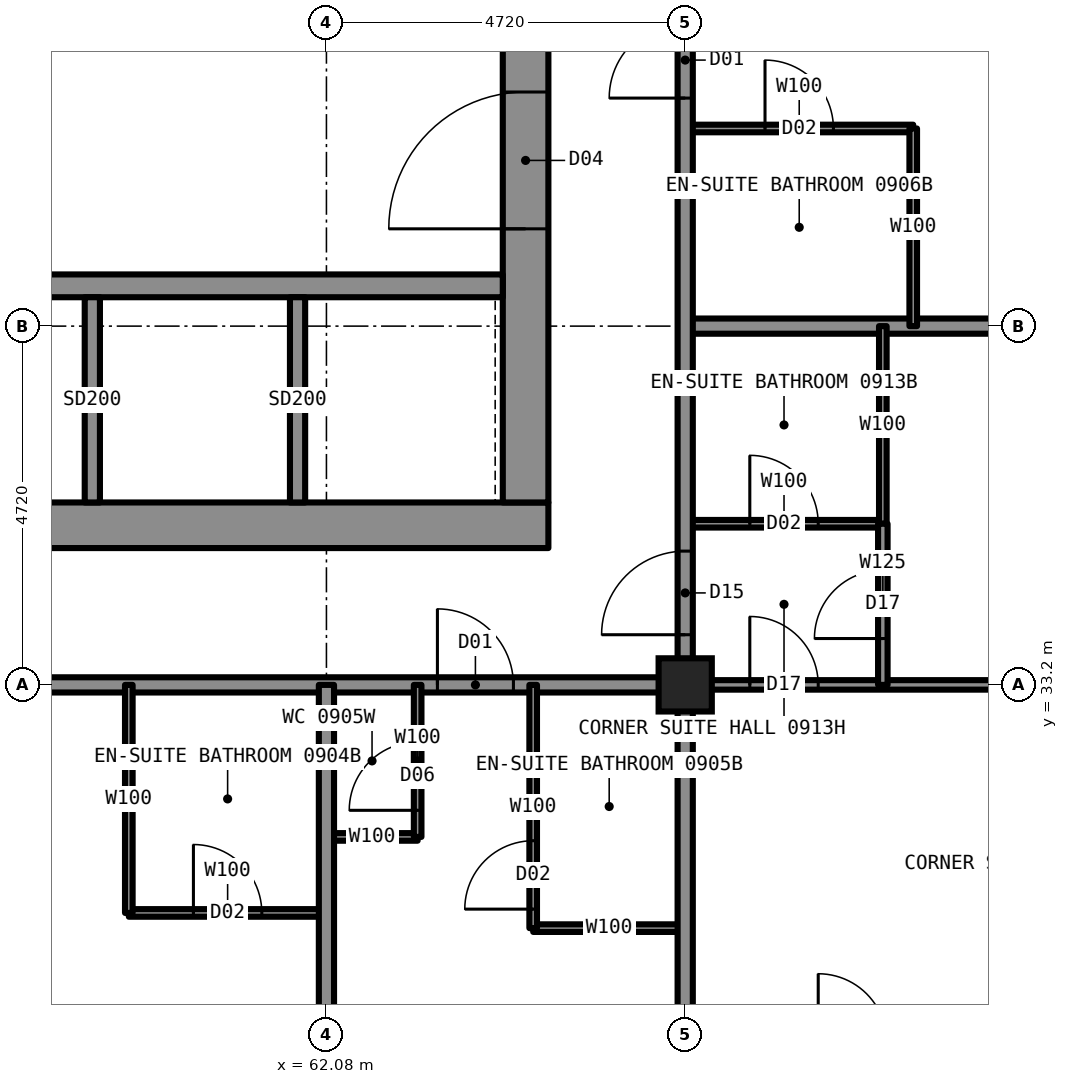
"""IFC4 building model, lengths in metres.
Left out: names, types, materials, properties, quantities, classifications, styles, units other than length and angle.
Written with IfcOpenShell. Run it as: python <this file> out.ifc"""

import sys

from ifc_helpers import new_model, si_unit, direction, frame, frame_2d, origin, origin_2d, place, context, subcontext, project, spatial, rectangle, hollow_rectangle, extrude, element, fill, save


model = new_model("IFC4")
c1 = context("Model", 3, precision=1e-05, world=origin(), true_north=direction((0.0, 1.0)))
c2 = subcontext(c1, "Body", "Model", "MODEL_VIEW")
j1 = project(units=[si_unit("LENGTHUNIT", "METRE"), si_unit("PLANEANGLEUNIT", "RADIAN")], contexts=[c1])
p1 = place(None, origin())
s1 = spatial("IfcSite", under=j1, at=p1, CompositionType="ELEMENT")
p2 = place(p1, origin())
s2 = spatial("IfcBuilding", under=s1, at=p2, CompositionType="ELEMENT")
p3 = place(p2, frame((0.0, 0.0, 39.0)))
s3 = spatial("IfcBuildingStorey", under=s2, at=p3, CompositionType="ELEMENT", Elevation=39.0)
p4 = place(p3, frame((66.8, 33.2, 0.0), z_axis=(0.0, 0.0, 1.0), x_axis=(1.0, 0.0, 0.0)))
e1 = element("IfcColumn", 1, at=p4, inside=s3, PredefinedType="COLUMN", context=c2, shape_type="SweptSolid", body=[
    extrude(hollow_rectangle(XDim=0.7, YDim=0.7, WallThickness=0.06, at=origin_2d()), origin(), (0.0, 0.0, 1.0), 3.5),
])
p5 = place(p3, frame((45.0, 35.3, 0.0), z_axis=(0.0, 0.0, 1.0), x_axis=(1.0, 0.0, 0.0)))
e2 = element("IfcWall", 2, at=p5, inside=s3, PredefinedType="SHEAR", context=c2, shape_type="SweptSolid", body=[
    extrude(rectangle(XDim=20.0, YDim=0.6, at=frame_2d((10.0, 0.0))), origin(), (0.0, 0.0, 1.0), 3.5),
])
p6 = place(p3, frame((64.7, 35.6, 0.0), z_axis=(0.0, 0.0, 1.0), x_axis=(0.0, 1.0, 0.0)))
e3 = element("IfcWall", 3, at=p6, inside=s3, PredefinedType="SHEAR", context=c2, shape_type="SweptSolid", body=[
    extrude(rectangle(XDim=18.8, YDim=0.6, at=frame_2d((9.4, 0.0))), origin(), (0.0, 0.0, 1.0), 3.5),
])
p7 = place(p6, frame((13.4, 0.0, 0.0)))
e4 = element("IfcOpeningElement", 4, at=p7, cuts=e3, PredefinedType="OPENING", context=c2, shape_type="SweptSolid", body=[
    extrude(rectangle(XDim=1.8, YDim=2.2, at=frame_2d((0.9, 1.1))), frame((0.0, 0.31, 0.0), z_axis=(0.0, -1.0, 0.0), x_axis=(1.0, 0.0, 0.0)), (0.0, 0.0, 1.0), 0.62),
])
p8 = place(p6, frame((3.6, 0.0, 0.0)))
e5 = element("IfcOpeningElement", 5, at=p8, cuts=e3, PredefinedType="OPENING", context=c2, shape_type="SweptSolid", body=[
    extrude(rectangle(XDim=1.8, YDim=2.2, at=frame_2d((0.9, 1.1))), frame((0.0, 0.31, 0.0), z_axis=(0.0, -1.0, 0.0), x_axis=(1.0, 0.0, 0.0)), (0.0, 0.0, 1.0), 0.62),
])
p9 = place(p3, frame((45.6, 38.45, 0.0), z_axis=(0.0, 0.0, 1.0), x_axis=(1.0, 0.0, 0.0)))
e6 = element("IfcWall", 6, at=p9, inside=s3, PredefinedType="SHEAR", context=c2, shape_type="SweptSolid", body=[
    extrude(rectangle(XDim=18.8, YDim=0.3, at=frame_2d((9.4, 0.0))), origin(), (0.0, 0.0, 1.0), 3.5),
])
p10 = place(p3, frame((43.2, 33.2, 0.0), z_axis=(0.0, 0.0, 1.0), x_axis=(1.0, 0.0, 0.0)))
e7 = element("IfcWall", 7, at=p10, inside=s3, PredefinedType="PARTITIONING", context=c2, shape_type="SweptSolid", body=[
    extrude(rectangle(XDim=23.6, YDim=0.2, at=frame_2d((11.8, 0.0))), origin(), (0.0, 0.0, 1.0), 3.33),
])
p11 = place(p10, frame((2.55, 0.0, 0.0)))
e8 = element("IfcOpeningElement", 8, at=p11, cuts=e7, PredefinedType="OPENING", context=c2, shape_type="SweptSolid", body=[
    extrude(rectangle(XDim=1.0, YDim=2.2, at=frame_2d((0.5, 1.1))), frame((0.0, 0.11, 0.0), z_axis=(0.0, -1.0, 0.0), x_axis=(1.0, 0.0, 0.0)), (0.0, 0.0, 1.0), 0.22),
])
p12 = place(p10, frame((6.57, 0.0, 0.0)))
e9 = element("IfcOpeningElement", 9, at=p12, cuts=e7, PredefinedType="OPENING", context=c2, shape_type="SweptSolid", body=[
    extrude(rectangle(XDim=1.1, YDim=2.2, at=frame_2d((0.55, 1.1))), frame((0.0, 0.11, 0.0), z_axis=(0.0, -1.0, 0.0), x_axis=(1.0, 0.0, 0.0)), (0.0, 0.0, 1.0), 0.22),
])
p13 = place(p10, frame((20.34, 0.0, 0.0)))
e10 = element("IfcOpeningElement", 10, at=p13, cuts=e7, PredefinedType="OPENING", context=c2, shape_type="SweptSolid", body=[
    extrude(rectangle(XDim=1.0, YDim=2.2, at=frame_2d((0.5, 1.1))), frame((0.0, 0.11, 0.0), z_axis=(0.0, -1.0, 0.0), x_axis=(1.0, 0.0, 0.0)), (0.0, 0.0, 1.0), 0.22),
])
p14 = place(p3, frame((66.8, 33.2, 0.0), z_axis=(0.0, 0.0, 1.0), x_axis=(1.0, 0.0, 0.0)))
e11 = element("IfcWall", 11, at=p14, inside=s3, PredefinedType="PARTITIONING", context=c2, shape_type="SweptSolid", body=[
    extrude(rectangle(XDim=9.9, YDim=0.125, at=frame_2d((4.95, 0.0))), origin(), (0.0, 0.0, 1.0), 2.573),
])
p15 = place(p14, frame((0.85, 0.0, 0.0)))
e12 = element("IfcOpeningElement", 12, at=p15, cuts=e11, PredefinedType="OPENING", context=c2, shape_type="SweptSolid", body=[
    extrude(rectangle(XDim=0.9, YDim=2.2, at=frame_2d((0.45, 1.1))), frame((0.0, 0.073, 0.0), z_axis=(0.0, -1.0, 0.0), x_axis=(1.0, 0.0, 0.0)), (0.0, 0.0, 1.0), 0.145),
])
p16 = place(p3, frame((62.08, 31.2, 0.0), z_axis=(0.0, 0.0, 1.0), x_axis=(1.0, 0.0, 0.0)))
e13 = element("IfcWall", 13, at=p16, inside=s3, PredefinedType="PARTITIONING", context=c2, shape_type="SweptSolid", body=[
    extrude(rectangle(XDim=1.2, YDim=0.1, at=frame_2d((0.6, 0.0))), origin(), (0.0, 0.0, 1.0), 3.33),
])
p17 = place(p3, frame((59.48, 30.2, 0.0), z_axis=(0.0, 0.0, 1.0), x_axis=(1.0, 0.0, 0.0)))
e14 = element("IfcWall", 14, at=p17, inside=s3, PredefinedType="PARTITIONING", context=c2, shape_type="SweptSolid", body=[
    extrude(rectangle(XDim=2.6, YDim=0.1, at=frame_2d((1.3, 0.0))), origin(), (0.0, 0.0, 1.0), 3.33),
])
p18 = place(p17, frame((0.85, 0.0, 0.0)))
e15 = element("IfcOpeningElement", 15, at=p18, cuts=e14, PredefinedType="OPENING", context=c2, shape_type="SweptSolid", body=[
    extrude(rectangle(XDim=0.9, YDim=2.1, at=frame_2d((0.45, 1.05))), frame((0.0, 0.06, 0.0), z_axis=(0.0, -1.0, 0.0), x_axis=(1.0, 0.0, 0.0)), (0.0, 0.0, 1.0), 0.12),
])
p19 = place(p3, frame((64.8, 30.0, 0.0), z_axis=(0.0, 0.0, 1.0), x_axis=(1.0, 0.0, 0.0)))
e16 = element("IfcWall", 16, at=p19, inside=s3, PredefinedType="PARTITIONING", context=c2, shape_type="SweptSolid", body=[
    extrude(rectangle(XDim=2.0, YDim=0.1, at=frame_2d((1.0, 0.0))), origin(), (0.0, 0.0, 1.0), 3.33),
])
p20 = place(p3, frame((66.8, 40.52, 0.0), z_axis=(0.0, 0.0, 1.0), x_axis=(1.0, 0.0, 0.0)))
e17 = element("IfcWall", 17, at=p20, inside=s3, PredefinedType="PARTITIONING", context=c2, shape_type="SweptSolid", body=[
    extrude(rectangle(XDim=3.0, YDim=0.1, at=frame_2d((1.5, 0.0))), origin(), (0.0, 0.0, 1.0), 3.33),
])
p21 = place(p20, frame((1.05, 0.0, 0.0)))
e18 = element("IfcOpeningElement", 18, at=p21, cuts=e17, PredefinedType="OPENING", context=c2, shape_type="SweptSolid", body=[
    extrude(rectangle(XDim=0.9, YDim=2.1, at=frame_2d((0.45, 1.05))), frame((0.0, 0.06, 0.0), z_axis=(0.0, -1.0, 0.0), x_axis=(1.0, 0.0, 0.0)), (0.0, 0.0, 1.0), 0.12),
])
p22 = place(p3, frame((66.8, 37.92, 0.0), z_axis=(0.0, 0.0, 1.0), x_axis=(1.0, 0.0, 0.0)))
e19 = element("IfcWall", 19, at=p22, inside=s3, PredefinedType="PARTITIONING", context=c2, shape_type="SweptSolid", body=[
    extrude(rectangle(XDim=9.9, YDim=0.2, at=frame_2d((4.95, 0.0))), origin(), (0.0, 0.0, 1.0), 2.573),
])
p23 = place(p3, frame((66.8, 35.32, 0.0), z_axis=(0.0, 0.0, 1.0), x_axis=(1.0, 0.0, 0.0)))
e20 = element("IfcWall", 20, at=p23, inside=s3, PredefinedType="PARTITIONING", context=c2, shape_type="SweptSolid", body=[
    extrude(rectangle(XDim=2.6, YDim=0.1, at=frame_2d((1.3, 0.0))), origin(), (0.0, 0.0, 1.0), 3.33),
])
p24 = place(p23, frame((0.85, 0.0, 0.0)))
e21 = element("IfcOpeningElement", 21, at=p24, cuts=e20, PredefinedType="OPENING", context=c2, shape_type="SweptSolid", body=[
    extrude(rectangle(XDim=0.9, YDim=2.1, at=frame_2d((0.45, 1.05))), frame((0.0, 0.06, 0.0), z_axis=(0.0, -1.0, 0.0), x_axis=(1.0, 0.0, 0.0)), (0.0, 0.0, 1.0), 0.12),
])
p25 = place(p3, frame((66.8, 33.2, 0.0), z_axis=(0.0, 0.0, 1.0), x_axis=(0.0, 1.0, 0.0)))
e22 = element("IfcWall", 22, at=p25, inside=s3, PredefinedType="PARTITIONING", context=c2, shape_type="SweptSolid", body=[
    extrude(rectangle(XDim=23.58, YDim=0.2, at=frame_2d((11.79, 0.0))), origin(), (0.0, 0.0, 1.0), 3.33),
])
p26 = place(p25, frame((7.72, 0.0, 0.0)))
e23 = element("IfcOpeningElement", 23, at=p26, cuts=e22, PredefinedType="OPENING", context=c2, shape_type="SweptSolid", body=[
    extrude(rectangle(XDim=1.0, YDim=2.2, at=frame_2d((0.5, 1.1))), frame((0.0, 0.11, 0.0), z_axis=(0.0, -1.0, 0.0), x_axis=(1.0, 0.0, 0.0)), (0.0, 0.0, 1.0), 0.22),
])
p27 = place(p25, frame((17.31, 0.0, 0.0)))
e24 = element("IfcOpeningElement", 24, at=p27, cuts=e22, PredefinedType="OPENING", context=c2, shape_type="SweptSolid", body=[
    extrude(rectangle(XDim=1.0, YDim=2.2, at=frame_2d((0.5, 1.1))), frame((0.0, 0.11, 0.0), z_axis=(0.0, -1.0, 0.0), x_axis=(1.0, 0.0, 0.0)), (0.0, 0.0, 1.0), 0.22),
])
p28 = place(p25, frame((21.84, 0.0, 0.0)))
e25 = element("IfcOpeningElement", 25, at=p28, cuts=e22, PredefinedType="OPENING", context=c2, shape_type="SweptSolid", body=[
    extrude(rectangle(XDim=1.1, YDim=2.2, at=frame_2d((0.55, 1.1))), frame((0.0, 0.11, 0.0), z_axis=(0.0, -1.0, 0.0), x_axis=(1.0, 0.0, 0.0)), (0.0, 0.0, 1.0), 0.22),
])
p29 = place(p25, frame((0.66, 0.0, 0.0)))
e26 = element("IfcOpeningElement", 26, at=p29, cuts=e22, PredefinedType="OPENING", context=c2, shape_type="SweptSolid", body=[
    extrude(rectangle(XDim=1.1, YDim=2.2, at=frame_2d((0.55, 1.1))), frame((0.0, 0.11, 0.0), z_axis=(0.0, -1.0, 0.0), x_axis=(1.0, 0.0, 0.0)), (0.0, 0.0, 1.0), 0.22),
])
p30 = place(p3, frame((66.8, 23.3, 0.0), z_axis=(0.0, 0.0, 1.0), x_axis=(0.0, 1.0, 0.0)))
e27 = element("IfcWall", 27, at=p30, inside=s3, PredefinedType="PARTITIONING", context=c2, shape_type="SweptSolid", body=[
    extrude(rectangle(XDim=9.9, YDim=0.2, at=frame_2d((4.95, 0.0))), origin(), (0.0, 0.0, 1.0), 2.573),
])
p31 = place(p3, frame((69.4, 35.32, 0.0), z_axis=(0.0, 0.0, 1.0), x_axis=(0.0, 1.0, 0.0)))
e28 = element("IfcWall", 28, at=p31, inside=s3, PredefinedType="PARTITIONING", context=c2, shape_type="SweptSolid", body=[
    extrude(rectangle(XDim=2.6, YDim=0.1, at=frame_2d((1.3, 0.0))), origin(), (0.0, 0.0, 1.0), 3.33),
])
p32 = place(p3, frame((69.4, 33.2, 0.0), z_axis=(0.0, 0.0, 1.0), x_axis=(0.0, 1.0, 0.0)))
e29 = element("IfcWall", 29, at=p32, inside=s3, PredefinedType="PARTITIONING", context=c2, shape_type="SweptSolid", body=[
    extrude(rectangle(XDim=2.12, YDim=0.125, at=frame_2d((1.06, 0.0))), origin(), (0.0, 0.0, 1.0), 3.33),
])
p33 = place(p32, frame((0.61, 0.0, 0.0)))
e30 = element("IfcOpeningElement", 30, at=p33, cuts=e29, PredefinedType="OPENING", context=c2, shape_type="SweptSolid", body=[
    extrude(rectangle(XDim=0.9, YDim=2.2, at=frame_2d((0.45, 1.1))), frame((0.0, 0.073, 0.0), z_axis=(0.0, -1.0, 0.0), x_axis=(1.0, 0.0, 0.0)), (0.0, 0.0, 1.0), 0.145),
])
p34 = place(p3, frame((69.8, 37.92, 0.0), z_axis=(0.0, 0.0, 1.0), x_axis=(0.0, 1.0, 0.0)))
e31 = element("IfcWall", 31, at=p34, inside=s3, PredefinedType="PARTITIONING", context=c2, shape_type="SweptSolid", body=[
    extrude(rectangle(XDim=2.6, YDim=0.1, at=frame_2d((1.3, 0.0))), origin(), (0.0, 0.0, 1.0), 3.33),
])
p35 = place(p3, frame((59.48, 30.2, 0.0), z_axis=(0.0, 0.0, 1.0), x_axis=(0.0, 1.0, 0.0)))
e32 = element("IfcWall", 32, at=p35, inside=s3, PredefinedType="PARTITIONING", context=c2, shape_type="SweptSolid", body=[
    extrude(rectangle(XDim=3.0, YDim=0.1, at=frame_2d((1.5, 0.0))), origin(), (0.0, 0.0, 1.0), 3.33),
])
p36 = place(p3, frame((62.08, 23.3, 0.0), z_axis=(0.0, 0.0, 1.0), x_axis=(0.0, 1.0, 0.0)))
e33 = element("IfcWall", 33, at=p36, inside=s3, PredefinedType="PARTITIONING", context=c2, shape_type="SweptSolid", body=[
    extrude(rectangle(XDim=9.9, YDim=0.2, at=frame_2d((4.95, 0.0))), origin(), (0.0, 0.0, 1.0), 2.573),
])
p37 = place(p3, frame((63.28, 31.2, 0.0), z_axis=(0.0, 0.0, 1.0), x_axis=(0.0, 1.0, 0.0)))
e34 = element("IfcWall", 34, at=p37, inside=s3, PredefinedType="PARTITIONING", context=c2, shape_type="SweptSolid", body=[
    extrude(rectangle(XDim=2.0, YDim=0.1, at=frame_2d((1.0, 0.0))), origin(), (0.0, 0.0, 1.0), 3.33),
])
p38 = place(p37, frame((0.35, 0.0, 0.0)))
e35 = element("IfcOpeningElement", 35, at=p38, cuts=e34, PredefinedType="OPENING", context=c2, shape_type="SweptSolid", body=[
    extrude(rectangle(XDim=0.9, YDim=2.1, at=frame_2d((0.45, 1.05))), frame((0.0, 0.06, 0.0), z_axis=(0.0, -1.0, 0.0), x_axis=(1.0, 0.0, 0.0)), (0.0, 0.0, 1.0), 0.12),
])
p39 = place(p3, frame((64.8, 30.0, 0.0), z_axis=(0.0, 0.0, 1.0), x_axis=(0.0, 1.0, 0.0)))
e36 = element("IfcWall", 36, at=p39, inside=s3, PredefinedType="PARTITIONING", context=c2, shape_type="SweptSolid", body=[
    extrude(rectangle(XDim=3.2, YDim=0.1, at=frame_2d((1.6, 0.0))), origin(), (0.0, 0.0, 1.0), 3.33),
])
p40 = place(p39, frame((0.25, 0.0, 0.0)))
e37 = element("IfcOpeningElement", 37, at=p40, cuts=e36, PredefinedType="OPENING", context=c2, shape_type="SweptSolid", body=[
    extrude(rectangle(XDim=0.9, YDim=2.1, at=frame_2d((0.45, 1.05))), frame((0.0, 0.06, 0.0), z_axis=(0.0, -1.0, 0.0), x_axis=(1.0, 0.0, 0.0)), (0.0, 0.0, 1.0), 0.12),
])
for number, where, z_axis, x_axis in (
    (38, (59.0, 35.6, 0.0), (0.0, 0.0, 1.0), (0.0, 1.0, 0.0)),
    (39, (61.7, 35.6, 0.0), (0.0, 0.0, 1.0), (0.0, 1.0, 0.0)),
):
    element("IfcWall", number, at=place(p3, frame(where, z_axis=z_axis, x_axis=x_axis)), inside=s3, PredefinedType="PARTITIONING", context=c2, shape_type="SweptSolid", body=[
        extrude(rectangle(XDim=2.7, YDim=0.2, at=frame_2d((1.35, 0.0))), origin(), (0.0, 0.0, 1.0), 3.33),
    ])
p41 = place(p18, origin())
e40 = element("IfcDoor", 40, at=p41, inside=s3, OperationType="SINGLE_SWING_RIGHT", PredefinedType="DOOR", context=c2, shape_type="SweptSolid", body=[
    extrude(rectangle(XDim=0.9, YDim=2.1, at=frame_2d((0.45, 1.05))), frame((0.0, 0.025, 0.0), z_axis=(0.0, -1.0, 0.0), x_axis=(1.0, 0.0, 0.0)), (0.0, 0.0, 1.0), 0.05),
])
fill(e15, e40)
p42 = place(p13, origin())
e41 = element("IfcDoor", 41, at=p42, inside=s3, OperationType="SINGLE_SWING_LEFT", PredefinedType="DOOR", context=c2, shape_type="SweptSolid", body=[
    extrude(rectangle(XDim=1.0, YDim=2.2, at=frame_2d((0.5, 1.1))), frame((0.0, 0.025, 0.0), z_axis=(0.0, -1.0, 0.0), x_axis=(1.0, 0.0, 0.0)), (0.0, 0.0, 1.0), 0.05),
])
fill(e10, e41)
p43 = place(p40, origin())
e42 = element("IfcDoor", 42, at=p43, inside=s3, OperationType="SINGLE_SWING_RIGHT", PredefinedType="DOOR", context=c2, shape_type="SweptSolid", body=[
    extrude(rectangle(XDim=0.9, YDim=2.1, at=frame_2d((0.45, 1.05))), frame((0.0, 0.025, 0.0), z_axis=(0.0, -1.0, 0.0), x_axis=(1.0, 0.0, 0.0)), (0.0, 0.0, 1.0), 0.05),
])
fill(e37, e42)
p44 = place(p38, origin())
e43 = element("IfcDoor", 43, at=p44, inside=s3, OperationType="SINGLE_SWING_LEFT", PredefinedType="DOOR", context=c2, shape_type="SweptSolid", body=[
    extrude(rectangle(XDim=0.9, YDim=2.1, at=frame_2d((0.45, 1.05))), frame((0.0, 0.025, 0.0), z_axis=(0.0, -1.0, 0.0), x_axis=(1.0, 0.0, 0.0)), (0.0, 0.0, 1.0), 0.05),
])
fill(e35, e43)
p45 = place(p26, origin())
e44 = element("IfcDoor", 44, at=p45, inside=s3, OperationType="SINGLE_SWING_LEFT", PredefinedType="DOOR", context=c2, shape_type="SweptSolid", body=[
    extrude(rectangle(XDim=1.0, YDim=2.2, at=frame_2d((0.5, 1.1))), frame((0.0, 0.025, 0.0), z_axis=(0.0, -1.0, 0.0), x_axis=(1.0, 0.0, 0.0)), (0.0, 0.0, 1.0), 0.05),
])
fill(e23, e44)
p46 = place(p21, origin())
e45 = element("IfcDoor", 45, at=p46, inside=s3, OperationType="SINGLE_SWING_RIGHT", PredefinedType="DOOR", context=c2, shape_type="SweptSolid", body=[
    extrude(rectangle(XDim=0.9, YDim=2.1, at=frame_2d((0.45, 1.05))), frame((0.0, 0.025, 0.0), z_axis=(0.0, -1.0, 0.0), x_axis=(1.0, 0.0, 0.0)), (0.0, 0.0, 1.0), 0.05),
])
fill(e18, e45)
p47 = place(p15, origin())
e46 = element("IfcDoor", 46, at=p47, inside=s3, OperationType="SINGLE_SWING_LEFT", PredefinedType="DOOR", context=c2, shape_type="SweptSolid", body=[
    extrude(rectangle(XDim=0.9, YDim=2.2, at=frame_2d((0.45, 1.1))), frame((0.0, 0.025, 0.0), z_axis=(0.0, -1.0, 0.0), x_axis=(1.0, 0.0, 0.0)), (0.0, 0.0, 1.0), 0.05),
])
fill(e12, e46)
p48 = place(p24, origin())
e47 = element("IfcDoor", 47, at=p48, inside=s3, OperationType="SINGLE_SWING_RIGHT", PredefinedType="DOOR", context=c2, shape_type="SweptSolid", body=[
    extrude(rectangle(XDim=0.9, YDim=2.1, at=frame_2d((0.45, 1.05))), frame((0.0, 0.025, 0.0), z_axis=(0.0, -1.0, 0.0), x_axis=(1.0, 0.0, 0.0)), (0.0, 0.0, 1.0), 0.05),
])
fill(e21, e47)
p49 = place(p29, origin())
e48 = element("IfcDoor", 48, at=p49, inside=s3, OperationType="SINGLE_SWING_LEFT", PredefinedType="DOOR", context=c2, shape_type="SweptSolid", body=[
    extrude(rectangle(XDim=1.1, YDim=2.2, at=frame_2d((0.55, 1.1))), frame((0.0, 0.025, 0.0), z_axis=(0.0, -1.0, 0.0), x_axis=(1.0, 0.0, 0.0)), (0.0, 0.0, 1.0), 0.05),
])
fill(e26, e48)
p50 = place(p33, origin())
e49 = element("IfcDoor", 49, at=p50, inside=s3, OperationType="SINGLE_SWING_LEFT", PredefinedType="DOOR", context=c2, shape_type="SweptSolid", body=[
    extrude(rectangle(XDim=0.9, YDim=2.2, at=frame_2d((0.45, 1.1))), frame((0.0, 0.025, 0.0), z_axis=(0.0, -1.0, 0.0), x_axis=(1.0, 0.0, 0.0)), (0.0, 0.0, 1.0), 0.05),
])
fill(e30, e49)
p51 = place(p8, origin())
e50 = element("IfcDoor", 50, at=p51, inside=s3, OperationType="DOUBLE_DOOR_SINGLE_SWING", PredefinedType="DOOR", context=c2, shape_type="SweptSolid", body=[
    extrude(rectangle(XDim=1.8, YDim=2.2, at=frame_2d((0.9, 1.1))), frame((0.0, 0.025, 0.0), z_axis=(0.0, -1.0, 0.0), x_axis=(1.0, 0.0, 0.0)), (0.0, 0.0, 1.0), 0.05),
])
fill(e5, e50)
save(model, sys.argv[1])
